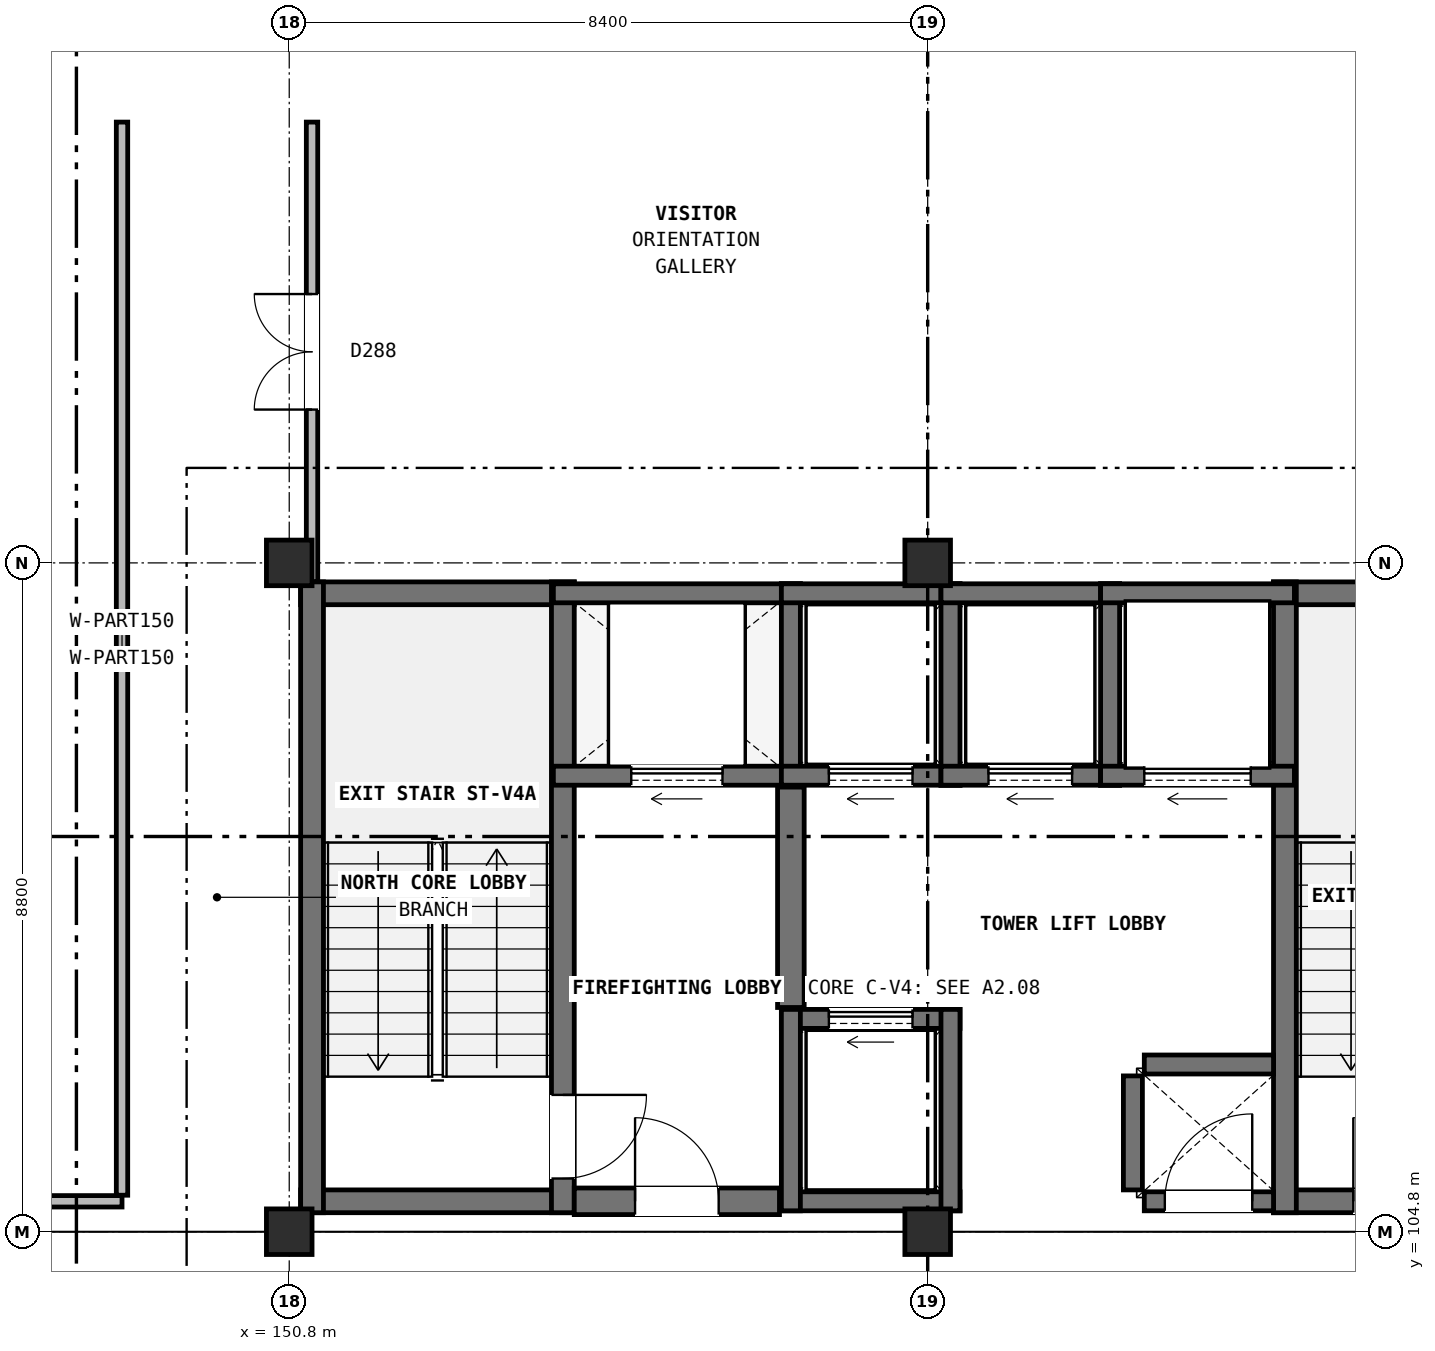
"""IFC4 building model, lengths in metres.
Left out: names, types, materials, properties, quantities, classifications, styles, units other than length and angle.
Written with IfcOpenShell. Run it as: python <this file> out.ifc"""

import sys

from ifc_helpers import new_model, si_unit, direction, frame, frame_2d, origin, origin_2d, place, context, subcontext, project, spatial, rectangle, extrude, element, fill, save


model = new_model("IFC4")
c1 = context("Model", 3, precision=1e-05, world=origin(), true_north=direction((0.0, 1.0)))
c2 = subcontext(c1, "Body", "Model", "MODEL_VIEW")
j1 = project(units=[si_unit("LENGTHUNIT", "METRE"), si_unit("PLANEANGLEUNIT", "RADIAN")], contexts=[c1])
p1 = place(None, origin())
s1 = spatial("IfcSite", under=j1, at=p1, CompositionType="ELEMENT")
p2 = place(p1, origin())
s2 = spatial("IfcBuilding", under=s1, at=p2, CompositionType="ELEMENT")
p3 = place(p2, frame((0.0, 0.0, 63.8)))
s3 = spatial("IfcBuildingStorey", under=s2, at=p3, CompositionType="ELEMENT", Elevation=63.8)
for number, where, z_axis, x_axis in (
    (1, (150.8, 104.8, 0.0), (0.0, 0.0, 1.0), (1.0, 0.0, 0.0)),
    (2, (150.8, 113.6, 0.0), (0.0, 0.0, 1.0), (1.0, 0.0, 0.0)),
    (3, (159.2, 104.8, 0.0), (0.0, 0.0, 1.0), (1.0, 0.0, 0.0)),
    (4, (159.2, 113.6, 0.0), (0.0, 0.0, 1.0), (1.0, 0.0, 0.0)),
):
    element("IfcColumn", number, at=place(p3, frame(where, z_axis=z_axis, x_axis=x_axis)), inside=s3, PredefinedType="COLUMN", context=c2, shape_type="SweptSolid", body=[
        extrude(rectangle(XDim=0.6, YDim=0.6, at=origin_2d()), origin(), (0.0, 0.0, 1.0), 4.2),
    ])
for number, where, z_axis, x_axis in (
    (5, (150.95, 105.2, 0.0), (0.0, 0.0, 1.0), (1.0, 0.0, 0.0)),
    (6, (150.95, 113.2, 0.0), (0.0, 0.0, 1.0), (1.0, 0.0, 0.0)),
):
    element("IfcWall", number, at=place(p3, frame(where, z_axis=z_axis, x_axis=x_axis)), inside=s3, PredefinedType="SHEAR", context=c2, shape_type="SweptSolid", body=[
        extrude(rectangle(XDim=3.6, YDim=0.3, at=frame_2d((1.8, 0.0))), origin(), (0.0, 0.0, 1.0), 4.2),
    ])
p4 = place(p3, frame((151.1, 105.05, 0.0), z_axis=(0.0, 0.0, 1.0), x_axis=(0.0, 1.0, 0.0)))
e7 = element("IfcWall", 7, at=p4, inside=s3, PredefinedType="SHEAR", context=c2, shape_type="SweptSolid", body=[
    extrude(rectangle(XDim=8.3, YDim=0.3, at=frame_2d((4.15, 0.0))), origin(), (0.0, 0.0, 1.0), 4.2),
])
p5 = place(p3, frame((154.4, 105.05, 0.0), z_axis=(0.0, 0.0, 1.0), x_axis=(0.0, 1.0, 0.0)))
e8 = element("IfcWall", 8, at=p5, inside=s3, PredefinedType="SHEAR", context=c2, shape_type="SweptSolid", body=[
    extrude(rectangle(XDim=8.3, YDim=0.3, at=frame_2d((4.15, 0.0))), origin(), (0.0, 0.0, 1.0), 4.2),
])
p6 = place(p5, frame((0.45, 0.0, 0.0)))
e9 = element("IfcOpeningElement", 9, at=p6, cuts=e8, PredefinedType="OPENING", context=c2, shape_type="SweptSolid", body=[
    extrude(rectangle(XDim=1.1, YDim=2.2, at=frame_2d((0.55, 1.1))), frame((0.0, 0.16, 0.0), z_axis=(0.0, -1.0, 0.0), x_axis=(1.0, 0.0, 0.0)), (0.0, 0.0, 1.0), 0.32),
])
p7 = place(p3, frame((163.75, 105.2, 0.0), z_axis=(0.0, 0.0, 1.0), x_axis=(1.0, 0.0, 0.0)))
e10 = element("IfcWall", 10, at=p7, inside=s3, PredefinedType="SHEAR", context=c2, shape_type="SweptSolid", body=[
    extrude(rectangle(XDim=3.6, YDim=0.3, at=frame_2d((1.8, 0.0))), origin(), (0.0, 0.0, 1.0), 4.2),
])
p8 = place(p7, frame((1.05, 0.0, 0.0)))
e11 = element("IfcOpeningElement", 11, at=p8, cuts=e10, PredefinedType="OPENING", context=c2, shape_type="SweptSolid", body=[
    extrude(rectangle(XDim=1.1, YDim=2.2, at=frame_2d((0.55, 1.1))), frame((0.0, 0.16, 0.0), z_axis=(0.0, -1.0, 0.0), x_axis=(1.0, 0.0, 0.0)), (0.0, 0.0, 1.0), 0.32),
])
p9 = place(p3, frame((163.75, 113.2, 0.0), z_axis=(0.0, 0.0, 1.0), x_axis=(1.0, 0.0, 0.0)))
e12 = element("IfcWall", 12, at=p9, inside=s3, PredefinedType="SHEAR", context=c2, shape_type="SweptSolid", body=[
    extrude(rectangle(XDim=3.6, YDim=0.3, at=frame_2d((1.8, 0.0))), origin(), (0.0, 0.0, 1.0), 4.2),
])
p10 = place(p3, frame((163.9, 105.05, 0.0), z_axis=(0.0, 0.0, 1.0), x_axis=(0.0, 1.0, 0.0)))
e13 = element("IfcWall", 13, at=p10, inside=s3, PredefinedType="SHEAR", context=c2, shape_type="SweptSolid", body=[
    extrude(rectangle(XDim=8.3, YDim=0.3, at=frame_2d((4.15, 0.0))), origin(), (0.0, 0.0, 1.0), 4.2),
])
p11 = place(p3, frame((154.275, 110.8, 0.0), z_axis=(0.0, 0.0, 1.0), x_axis=(1.0, 0.0, 0.0)))
e14 = element("IfcWall", 14, at=p11, inside=s3, PredefinedType="SOLIDWALL", context=c2, shape_type="SweptSolid", body=[
    extrude(rectangle(XDim=3.25, YDim=0.25, at=frame_2d((1.625, 0.0))), origin(), (0.0, 0.0, 1.0), 3.88),
])
p12 = place(p11, frame((1.025, 0.0, 0.0)))
e15 = element("IfcOpeningElement", 15, at=p12, cuts=e14, PredefinedType="OPENING", context=c2, shape_type="SweptSolid", body=[
    extrude(rectangle(XDim=1.2, YDim=2.2, at=frame_2d((0.6, 1.1))), frame((0.0, 0.135, 0.0), z_axis=(0.0, -1.0, 0.0), x_axis=(1.0, 0.0, 0.0)), (0.0, 0.0, 1.0), 0.27),
])
p13 = place(p3, frame((154.275, 113.2, 0.0), z_axis=(0.0, 0.0, 1.0), x_axis=(1.0, 0.0, 0.0)))
e16 = element("IfcWall", 16, at=p13, inside=s3, PredefinedType="SOLIDWALL", context=c2, shape_type="SweptSolid", body=[
    extrude(rectangle(XDim=3.25, YDim=0.25, at=frame_2d((1.625, 0.0))), origin(), (0.0, 0.0, 1.0), 3.88),
])
p14 = place(p3, frame((157.4, 110.675, 0.0), z_axis=(0.0, 0.0, 1.0), x_axis=(0.0, 1.0, 0.0)))
e17 = element("IfcWall", 17, at=p14, inside=s3, PredefinedType="SOLIDWALL", context=c2, shape_type="SweptSolid", body=[
    extrude(rectangle(XDim=2.65, YDim=0.25, at=frame_2d((1.325, 0.0))), origin(), (0.0, 0.0, 1.0), 3.88),
])
p15 = place(p3, frame((157.275, 110.8, 0.0), z_axis=(0.0, 0.0, 1.0), x_axis=(1.0, 0.0, 0.0)))
e18 = element("IfcWall", 18, at=p15, inside=s3, PredefinedType="SOLIDWALL", context=c2, shape_type="SweptSolid", body=[
    extrude(rectangle(XDim=2.35, YDim=0.25, at=frame_2d((1.175, 0.0))), origin(), (0.0, 0.0, 1.0), 3.88),
])
p16 = place(p15, frame((0.625, 0.0, 0.0)))
e19 = element("IfcOpeningElement", 19, at=p16, cuts=e18, PredefinedType="OPENING", context=c2, shape_type="SweptSolid", body=[
    extrude(rectangle(XDim=1.1, YDim=2.2, at=frame_2d((0.55, 1.1))), frame((0.0, 0.135, 0.0), z_axis=(0.0, -1.0, 0.0), x_axis=(1.0, 0.0, 0.0)), (0.0, 0.0, 1.0), 0.27),
])
p17 = place(p3, frame((157.275, 113.2, 0.0), z_axis=(0.0, 0.0, 1.0), x_axis=(1.0, 0.0, 0.0)))
e20 = element("IfcWall", 20, at=p17, inside=s3, PredefinedType="SOLIDWALL", context=c2, shape_type="SweptSolid", body=[
    extrude(rectangle(XDim=2.35, YDim=0.25, at=frame_2d((1.175, 0.0))), origin(), (0.0, 0.0, 1.0), 3.88),
])
p18 = place(p3, frame((159.5, 110.675, 0.0), z_axis=(0.0, 0.0, 1.0), x_axis=(0.0, 1.0, 0.0)))
e21 = element("IfcWall", 21, at=p18, inside=s3, PredefinedType="SOLIDWALL", context=c2, shape_type="SweptSolid", body=[
    extrude(rectangle(XDim=2.65, YDim=0.25, at=frame_2d((1.325, 0.0))), origin(), (0.0, 0.0, 1.0), 3.88),
])
p19 = place(p3, frame((159.375, 110.8, 0.0), z_axis=(0.0, 0.0, 1.0), x_axis=(1.0, 0.0, 0.0)))
e22 = element("IfcWall", 22, at=p19, inside=s3, PredefinedType="SOLIDWALL", context=c2, shape_type="SweptSolid", body=[
    extrude(rectangle(XDim=2.35, YDim=0.25, at=frame_2d((1.175, 0.0))), origin(), (0.0, 0.0, 1.0), 3.88),
])
p20 = place(p19, frame((0.625, 0.0, 0.0)))
e23 = element("IfcOpeningElement", 23, at=p20, cuts=e22, PredefinedType="OPENING", context=c2, shape_type="SweptSolid", body=[
    extrude(rectangle(XDim=1.1, YDim=2.2, at=frame_2d((0.55, 1.1))), frame((0.0, 0.135, 0.0), z_axis=(0.0, -1.0, 0.0), x_axis=(1.0, 0.0, 0.0)), (0.0, 0.0, 1.0), 0.27),
])
p21 = place(p3, frame((159.375, 113.2, 0.0), z_axis=(0.0, 0.0, 1.0), x_axis=(1.0, 0.0, 0.0)))
e24 = element("IfcWall", 24, at=p21, inside=s3, PredefinedType="SOLIDWALL", context=c2, shape_type="SweptSolid", body=[
    extrude(rectangle(XDim=2.35, YDim=0.25, at=frame_2d((1.175, 0.0))), origin(), (0.0, 0.0, 1.0), 3.88),
])
p22 = place(p3, frame((161.6, 110.675, 0.0), z_axis=(0.0, 0.0, 1.0), x_axis=(0.0, 1.0, 0.0)))
e25 = element("IfcWall", 25, at=p22, inside=s3, PredefinedType="SOLIDWALL", context=c2, shape_type="SweptSolid", body=[
    extrude(rectangle(XDim=2.65, YDim=0.25, at=frame_2d((1.325, 0.0))), origin(), (0.0, 0.0, 1.0), 3.88),
])
p23 = place(p3, frame((157.275, 105.2, 0.0), z_axis=(0.0, 0.0, 1.0), x_axis=(1.0, 0.0, 0.0)))
e26 = element("IfcWall", 26, at=p23, inside=s3, PredefinedType="SOLIDWALL", context=c2, shape_type="SweptSolid", body=[
    extrude(rectangle(XDim=2.35, YDim=0.25, at=frame_2d((1.175, 0.0))), origin(), (0.0, 0.0, 1.0), 3.88),
])
p24 = place(p3, frame((157.275, 107.6, 0.0), z_axis=(0.0, 0.0, 1.0), x_axis=(1.0, 0.0, 0.0)))
e27 = element("IfcWall", 27, at=p24, inside=s3, PredefinedType="SOLIDWALL", context=c2, shape_type="SweptSolid", body=[
    extrude(rectangle(XDim=2.35, YDim=0.25, at=frame_2d((1.175, 0.0))), origin(), (0.0, 0.0, 1.0), 3.88),
])
p25 = place(p24, frame((0.625, 0.0, 0.0)))
e28 = element("IfcOpeningElement", 28, at=p25, cuts=e27, PredefinedType="OPENING", context=c2, shape_type="SweptSolid", body=[
    extrude(rectangle(XDim=1.1, YDim=2.2, at=frame_2d((0.55, 1.1))), frame((0.0, 0.135, 0.0), z_axis=(0.0, -1.0, 0.0), x_axis=(1.0, 0.0, 0.0)), (0.0, 0.0, 1.0), 0.27),
])
for number, where, z_axis, x_axis in (
    (29, (157.4, 105.075, 0.0), (0.0, 0.0, 1.0), (0.0, 1.0, 0.0)),
    (30, (159.5, 105.075, 0.0), (0.0, 0.0, 1.0), (0.0, 1.0, 0.0)),
):
    element("IfcWall", number, at=place(p3, frame(where, z_axis=z_axis, x_axis=x_axis)), inside=s3, PredefinedType="SOLIDWALL", context=c2, shape_type="SweptSolid", body=[
        extrude(rectangle(XDim=2.65, YDim=0.25, at=frame_2d((1.325, 0.0))), origin(), (0.0, 0.0, 1.0), 3.88),
    ])
p26 = place(p3, frame((161.475, 110.8, 0.0), z_axis=(0.0, 0.0, 1.0), x_axis=(1.0, 0.0, 0.0)))
e31 = element("IfcWall", 31, at=p26, inside=s3, PredefinedType="SOLIDWALL", context=c2, shape_type="SweptSolid", body=[
    extrude(rectangle(XDim=2.55, YDim=0.25, at=frame_2d((1.275, 0.0))), origin(), (0.0, 0.0, 1.0), 3.88),
])
p27 = place(p26, frame((0.575, 0.0, 0.0)))
e32 = element("IfcOpeningElement", 32, at=p27, cuts=e31, PredefinedType="OPENING", context=c2, shape_type="SweptSolid", body=[
    extrude(rectangle(XDim=1.4, YDim=2.3, at=frame_2d((0.7, 1.15))), frame((0.0, 0.135, 0.0), z_axis=(0.0, -1.0, 0.0), x_axis=(1.0, 0.0, 0.0)), (0.0, 0.0, 1.0), 0.27),
])
p28 = place(p3, frame((161.475, 113.2, 0.0), z_axis=(0.0, 0.0, 1.0), x_axis=(1.0, 0.0, 0.0)))
e33 = element("IfcWall", 33, at=p28, inside=s3, PredefinedType="SOLIDWALL", context=c2, shape_type="SweptSolid", body=[
    extrude(rectangle(XDim=2.55, YDim=0.25, at=frame_2d((1.275, 0.0))), origin(), (0.0, 0.0, 1.0), 3.88),
])
p29 = place(p3, frame((157.4, 107.75, 0.0), z_axis=(0.0, 0.0, 1.0), x_axis=(0.0, 1.0, 0.0)))
e34 = element("IfcWall", 34, at=p29, inside=s3, PredefinedType="SHEAR", context=c2, shape_type="SweptSolid", body=[
    extrude(rectangle(XDim=2.9, YDim=0.35, at=frame_2d((1.45, 0.0))), origin(), (0.0, 0.0, 1.0), 3.88),
])
p30 = place(p3, frame((154.55, 105.2, 0.0), z_axis=(0.0, 0.0, 1.0), x_axis=(1.0, 0.0, 0.0)))
e35 = element("IfcWall", 35, at=p30, inside=s3, PredefinedType="SHEAR", context=c2, shape_type="SweptSolid", body=[
    extrude(rectangle(XDim=2.7, YDim=0.35, at=frame_2d((1.35, 0.0))), origin(), (0.0, 0.0, 1.0), 3.88),
])
p31 = place(p30, frame((0.8, 0.0, 0.0)))
e36 = element("IfcOpeningElement", 36, at=p31, cuts=e35, PredefinedType="OPENING", context=c2, shape_type="SweptSolid", body=[
    extrude(rectangle(XDim=1.1, YDim=2.2, at=frame_2d((0.55, 1.1))), frame((0.0, 0.185, 0.0), z_axis=(0.0, -1.0, 0.0), x_axis=(1.0, 0.0, 0.0)), (0.0, 0.0, 1.0), 0.37),
])
p32 = place(p3, frame((161.9, 105.35, 0.0), z_axis=(0.0, 0.0, 1.0), x_axis=(0.0, 1.0, 0.0)))
e37 = element("IfcWall", 37, at=p32, inside=s3, PredefinedType="SOLIDWALL", context=c2, shape_type="SweptSolid", body=[
    extrude(rectangle(XDim=1.5, YDim=0.25, at=frame_2d((0.75, 0.0))), origin(), (0.0, 0.0, 1.0), 3.88),
])
p33 = place(p3, frame((162.05, 107.0, 0.0), z_axis=(0.0, 0.0, 1.0), x_axis=(1.0, 0.0, 0.0)))
e38 = element("IfcWall", 38, at=p33, inside=s3, PredefinedType="SOLIDWALL", context=c2, shape_type="SweptSolid", body=[
    extrude(rectangle(XDim=1.7, YDim=0.25, at=frame_2d((0.85, 0.0))), origin(), (0.0, 0.0, 1.0), 3.88),
])
p34 = place(p3, frame((162.05, 105.2, 0.0), z_axis=(0.0, 0.0, 1.0), x_axis=(1.0, 0.0, 0.0)))
e39 = element("IfcWall", 39, at=p34, inside=s3, PredefinedType="SOLIDWALL", context=c2, shape_type="SweptSolid", body=[
    extrude(rectangle(XDim=1.7, YDim=0.25, at=frame_2d((0.85, 0.0))), origin(), (0.0, 0.0, 1.0), 3.88),
])
p35 = place(p34, frame((0.27, 0.0, 0.0)))
e40 = element("IfcOpeningElement", 40, at=p35, cuts=e39, PredefinedType="OPENING", context=c2, shape_type="SweptSolid", body=[
    extrude(rectangle(XDim=1.15, YDim=2.2, at=frame_2d((0.575, 1.1))), frame((0.0, 0.135, 0.0), z_axis=(0.0, -1.0, 0.0), x_axis=(1.0, 0.0, 0.0)), (0.0, 0.0, 1.0), 0.27),
])
p36 = place(p3, frame((142.4, 105.2, 0.0), z_axis=(0.0, 0.0, 1.0), x_axis=(1.0, 0.0, 0.0)))
e41 = element("IfcWall", 41, at=p36, inside=s3, PredefinedType="PARTITIONING", context=c2, shape_type="SweptSolid", body=[
    extrude(rectangle(XDim=6.2, YDim=0.15, at=frame_2d((3.1, 0.0))), origin(), (0.0, 0.0, 1.0), 3.445),
])
p37 = place(p36, frame((2.63, 0.0, 0.0)))
e42 = element("IfcOpeningElement", 42, at=p37, cuts=e41, PredefinedType="OPENING", context=c2, shape_type="SweptSolid", body=[
    extrude(rectangle(XDim=0.94, YDim=2.12, at=frame_2d((0.47, 1.06))), frame((0.0, 0.085, 0.0), z_axis=(0.0, -1.0, 0.0), x_axis=(1.0, 0.0, 0.0)), (0.0, 0.0, 1.0), 0.17),
])
p38 = place(p3, frame((148.6, 105.28, 0.0), z_axis=(0.0, 0.0, 1.0), x_axis=(0.0, 1.0, 0.0)))
e43 = element("IfcWall", 43, at=p38, inside=s3, PredefinedType="PARTITIONING", context=c2, shape_type="SweptSolid", body=[
    extrude(rectangle(XDim=14.12, YDim=0.15, at=frame_2d((7.06, 0.0))), origin(), (0.0, 0.0, 1.0), 3.865),
])
p39 = place(p3, frame((151.1, 113.355, 0.0), z_axis=(0.0, 0.0, 1.0), x_axis=(0.0, 1.0, 0.0)))
e44 = element("IfcWall", 44, at=p39, inside=s3, PredefinedType="PARTITIONING", context=c2, shape_type="SweptSolid", body=[
    extrude(rectangle(XDim=6.045, YDim=0.15, at=frame_2d((3.022, 0.0))), origin(), (0.0, 0.0, 1.0), 3.445),
])
p40 = place(p39, frame((2.262, 0.0, 0.0)))
e45 = element("IfcOpeningElement", 45, at=p40, cuts=e44, PredefinedType="OPENING", context=c2, shape_type="SweptSolid", body=[
    extrude(rectangle(XDim=1.52, YDim=2.28, at=frame_2d((0.76, 1.14))), frame((0.0, 0.085, 0.0), z_axis=(0.0, -1.0, 0.0), x_axis=(1.0, 0.0, 0.0)), (0.0, 0.0, 1.0), 0.17),
])
p41 = place(p6, frame((1.1, 0.0, 0.0), z_axis=(0.0, 0.0, 1.0), x_axis=(-1.0, 0.0, 0.0)))
e46 = element("IfcDoor", 46, at=p41, inside=s3, OperationType="SINGLE_SWING_RIGHT", PredefinedType="DOOR", context=c2, shape_type="SweptSolid", body=[
    extrude(rectangle(XDim=1.1, YDim=2.2, at=frame_2d((0.55, 1.1))), frame((0.0, 0.025, 0.0), z_axis=(0.0, -1.0, 0.0), x_axis=(1.0, 0.0, 0.0)), (0.0, 0.0, 1.0), 0.05),
])
fill(e9, e46)
p42 = place(p8, origin())
e47 = element("IfcDoor", 47, at=p42, inside=s3, OperationType="SINGLE_SWING_LEFT", PredefinedType="DOOR", context=c2, shape_type="SweptSolid", body=[
    extrude(rectangle(XDim=1.1, YDim=2.2, at=frame_2d((0.55, 1.1))), frame((0.0, 0.025, 0.0), z_axis=(0.0, -1.0, 0.0), x_axis=(1.0, 0.0, 0.0)), (0.0, 0.0, 1.0), 0.05),
])
fill(e11, e47)
p43 = place(p12, origin())
e48 = element("IfcDoor", 48, at=p43, inside=s3, OperationType="SLIDING_TO_LEFT", PredefinedType="DOOR", context=c2, shape_type="SweptSolid", body=[
    extrude(rectangle(XDim=1.2, YDim=2.2, at=frame_2d((0.6, 1.1))), frame((0.0, 0.025, 0.0), z_axis=(0.0, -1.0, 0.0), x_axis=(1.0, 0.0, 0.0)), (0.0, 0.0, 1.0), 0.05),
])
fill(e15, e48)
p44 = place(p16, origin())
e49 = element("IfcDoor", 49, at=p44, inside=s3, OperationType="SLIDING_TO_LEFT", PredefinedType="DOOR", context=c2, shape_type="SweptSolid", body=[
    extrude(rectangle(XDim=1.1, YDim=2.2, at=frame_2d((0.55, 1.1))), frame((0.0, 0.025, 0.0), z_axis=(0.0, -1.0, 0.0), x_axis=(1.0, 0.0, 0.0)), (0.0, 0.0, 1.0), 0.05),
])
fill(e19, e49)
p45 = place(p20, origin())
e50 = element("IfcDoor", 50, at=p45, inside=s3, OperationType="SLIDING_TO_LEFT", PredefinedType="DOOR", context=c2, shape_type="SweptSolid", body=[
    extrude(rectangle(XDim=1.1, YDim=2.2, at=frame_2d((0.55, 1.1))), frame((0.0, 0.025, 0.0), z_axis=(0.0, -1.0, 0.0), x_axis=(1.0, 0.0, 0.0)), (0.0, 0.0, 1.0), 0.05),
])
fill(e23, e50)
p46 = place(p25, origin())
e51 = element("IfcDoor", 51, at=p46, inside=s3, OperationType="SLIDING_TO_LEFT", PredefinedType="DOOR", context=c2, shape_type="SweptSolid", body=[
    extrude(rectangle(XDim=1.1, YDim=2.2, at=frame_2d((0.55, 1.1))), frame((0.0, 0.025, 0.0), z_axis=(0.0, -1.0, 0.0), x_axis=(1.0, 0.0, 0.0)), (0.0, 0.0, 1.0), 0.05),
])
fill(e28, e51)
p47 = place(p27, origin())
e52 = element("IfcDoor", 52, at=p47, inside=s3, OperationType="SLIDING_TO_LEFT", PredefinedType="DOOR", context=c2, shape_type="SweptSolid", body=[
    extrude(rectangle(XDim=1.4, YDim=2.3, at=frame_2d((0.7, 1.15))), frame((0.0, 0.025, 0.0), z_axis=(0.0, -1.0, 0.0), x_axis=(1.0, 0.0, 0.0)), (0.0, 0.0, 1.0), 0.05),
])
fill(e32, e52)
p48 = place(p31, origin())
e53 = element("IfcDoor", 53, at=p48, inside=s3, OperationType="SINGLE_SWING_LEFT", PredefinedType="DOOR", context=c2, shape_type="SweptSolid", body=[
    extrude(rectangle(XDim=1.1, YDim=2.2, at=frame_2d((0.55, 1.1))), frame((0.0, 0.025, 0.0), z_axis=(0.0, -1.0, 0.0), x_axis=(1.0, 0.0, 0.0)), (0.0, 0.0, 1.0), 0.05),
])
fill(e36, e53)
p49 = place(p35, origin())
e54 = element("IfcDoor", 54, at=p49, inside=s3, OperationType="SINGLE_SWING_RIGHT", PredefinedType="DOOR", context=c2, shape_type="SweptSolid", body=[
    extrude(rectangle(XDim=1.15, YDim=2.2, at=frame_2d((0.575, 1.1))), frame((0.0, 0.025, 0.0), z_axis=(0.0, -1.0, 0.0), x_axis=(1.0, 0.0, 0.0)), (0.0, 0.0, 1.0), 0.05),
])
fill(e40, e54)
p50 = place(p40, origin())
e55 = element("IfcDoor", 55, at=p50, inside=s3, OperationType="DOUBLE_DOOR_SINGLE_SWING", PredefinedType="DOOR", context=c2, shape_type="SweptSolid", body=[
    extrude(rectangle(XDim=1.52, YDim=2.28, at=frame_2d((0.76, 1.14))), frame((0.0, 0.025, 0.0), z_axis=(0.0, -1.0, 0.0), x_axis=(1.0, 0.0, 0.0)), (0.0, 0.0, 1.0), 0.05),
])
fill(e45, e55)
save(model, sys.argv[1])
